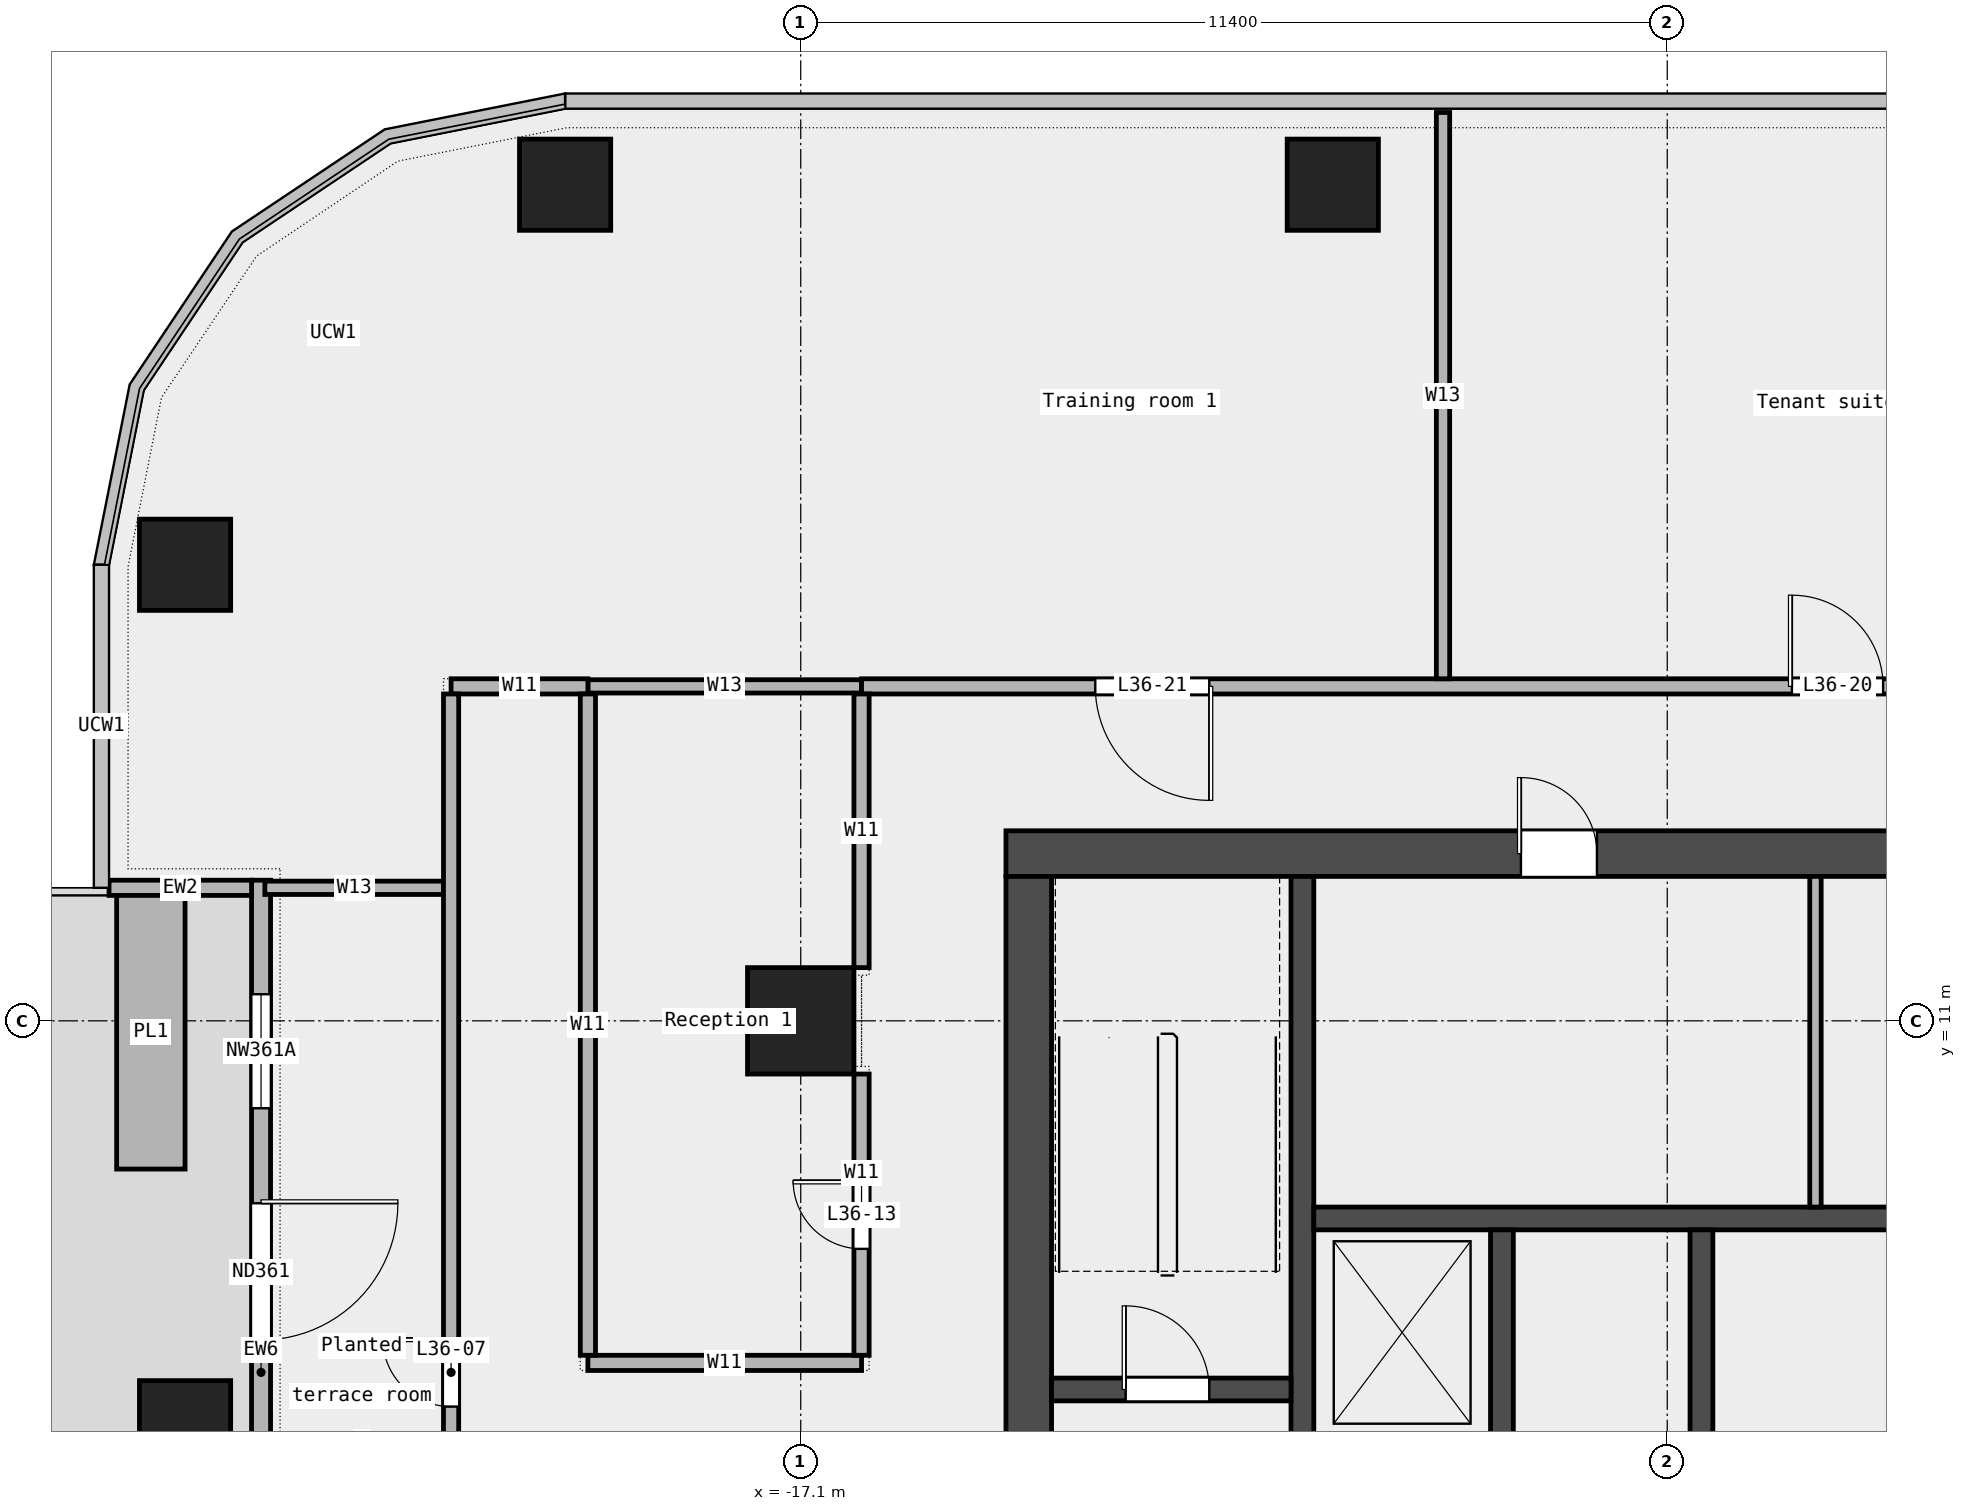
"""IFC4 building model, lengths in metres.
Left out: names, types, materials, properties, quantities, classifications, styles, units other than length and angle.
Written with IfcOpenShell. Run it as: python <this file> out.ifc"""

import sys

from ifc_helpers import new_model, si_unit, direction, frame, frame_2d, origin, origin_2d, place, context, subcontext, project, spatial, rectangle, extrude, element, fill, save


model = new_model("IFC4")
c1 = context("Model", 3, precision=1e-05, world=origin(), true_north=direction((0.0, 1.0)))
c2 = subcontext(c1, "Body", "Model", "MODEL_VIEW")
j1 = project(units=[si_unit("LENGTHUNIT", "METRE"), si_unit("PLANEANGLEUNIT", "RADIAN")], contexts=[c1])
p1 = place(None, origin())
s1 = spatial("IfcSite", under=j1, at=p1, CompositionType="ELEMENT")
p2 = place(p1, origin())
s2 = spatial("IfcBuilding", under=s1, at=p2, CompositionType="ELEMENT")
p3 = place(p2, frame((0.0, 0.0, 177.0)))
s3 = spatial("IfcBuildingStorey", under=s2, at=p3, CompositionType="ELEMENT", Elevation=177.0)
for number, where, z_axis, x_axis in (
    (1, (-10.1, 22.0, 0.0), (0.0, 0.0, 1.0), (1.0, 0.0, 0.0)),
    (2, (-20.2, 22.0, 0.0), (0.0, 0.0, 1.0), (1.0, 0.0, 0.0)),
    (3, (-25.2, 17.0, 0.0), (0.0, 0.0, 1.0), (1.0, 0.0, 0.0)),
    (4, (-25.2, 5.667, 0.0), (0.0, 0.0, 1.0), (1.0, 0.0, 0.0)),
):
    element("IfcColumn", number, at=place(p3, frame(where, z_axis=z_axis, x_axis=x_axis)), inside=s3, PredefinedType="COLUMN", context=c2, shape_type="SweptSolid", body=[
        extrude(rectangle(XDim=1.2, YDim=1.2, at=origin_2d()), origin(), (0.0, 0.0, 1.0), 3.6),
    ])
p4 = place(p3, frame((-17.1, 11.0, 0.0), z_axis=(0.0, 0.0, 1.0), x_axis=(1.0, 0.0, 0.0)))
e5 = element("IfcColumn", 5, at=p4, inside=s3, PredefinedType="COLUMN", context=c2, shape_type="SweptSolid", body=[
    extrude(rectangle(XDim=1.4, YDim=1.4, at=origin_2d()), origin(), (0.0, 0.0, 1.0), 3.6),
])
p5 = place(p3, frame((-24.2, 12.85, 0.0), z_axis=(0.0, 0.0, 1.0), x_axis=(0.0, -1.0, 0.0)))
e6 = element("IfcWall", 6, at=p5, inside=s3, PredefinedType="STANDARD", context=c2, shape_type="SweptSolid", body=[
    extrude(rectangle(XDim=12.95, YDim=0.25, at=frame_2d((6.475, 0.0))), origin(), (0.0, 0.0, 1.0), 3.6),
])
p6 = place(p5, frame((1.5, 0.0, 0.45)))
e7 = element("IfcOpeningElement", 7, at=p6, cuts=e6, PredefinedType="OPENING", context=c2, shape_type="SweptSolid", body=[
    extrude(rectangle(XDim=1.5, YDim=2.4, at=frame_2d((0.75, 1.2))), frame((0.0, 0.137, 0.0), z_axis=(0.0, -1.0, 0.0), x_axis=(1.0, 0.0, 0.0)), (0.0, 0.0, 1.0), 0.274),
])
p7 = place(p5, frame((4.25, 0.0, 0.0)))
e8 = element("IfcOpeningElement", 8, at=p7, cuts=e6, PredefinedType="OPENING", context=c2, shape_type="SweptSolid", body=[
    extrude(rectangle(XDim=1.8, YDim=2.4, at=frame_2d((0.9, 1.2))), frame((0.0, 0.137, 0.0), z_axis=(0.0, -1.0, 0.0), x_axis=(1.0, 0.0, 0.0)), (0.0, 0.0, 1.0), 0.274),
])
p8 = place(p5, frame((10.0, 0.0, 0.45)))
e9 = element("IfcOpeningElement", 9, at=p8, cuts=e6, PredefinedType="OPENING", context=c2, shape_type="SweptSolid", body=[
    extrude(rectangle(XDim=1.5, YDim=2.4, at=frame_2d((0.75, 1.2))), frame((0.0, 0.137, 0.0), z_axis=(0.0, -1.0, 0.0), x_axis=(1.0, 0.0, 0.0)), (0.0, 0.0, 1.0), 0.274),
])
p9 = place(p3, frame((-26.2, 12.75, 0.0), z_axis=(0.0, 0.0, 1.0), x_axis=(1.0, 0.0, 0.0)))
e10 = element("IfcWall", 10, at=p9, inside=s3, PredefinedType="STANDARD", context=c2, shape_type="SweptSolid", body=[
    extrude(rectangle(XDim=1.875, YDim=0.2, at=frame_2d((0.938, 0.0))), origin(), (0.0, 0.0, 1.0), 3.6),
])
p10 = place(p3, frame((-25.65, 12.65, 0.0), z_axis=(0.0, 0.0, 1.0), x_axis=(0.0, -1.0, 0.0)))
e11 = element("IfcWall", 11, at=p10, inside=s3, PredefinedType="STANDARD", context=c2, shape_type="SweptSolid", body=[
    extrude(rectangle(XDim=3.6, YDim=0.9, at=frame_2d((1.8, 0.0))), origin(), (0.0, 0.0, 1.0), 0.7),
])
p11 = place(p3, frame((-19.9, 6.5, 0.0), z_axis=(0.0, 0.0, 1.0), x_axis=(1.0, 0.0, 0.0)))
e12 = element("IfcWall", 12, at=p11, inside=s3, PredefinedType="PARTITIONING", context=c2, shape_type="SweptSolid", body=[
    extrude(rectangle(XDim=3.6, YDim=0.2, at=frame_2d((1.8, 0.0))), origin(), (0.0, 0.0, 1.0), 3.6),
])
p12 = place(p3, frame((-24.15, 12.75, 0.0), z_axis=(0.0, 0.0, 1.0), x_axis=(1.0, 0.0, 0.0)))
e13 = element("IfcWall", 13, at=p12, inside=s3, PredefinedType="PARTITIONING", context=c2, shape_type="SweptSolid", body=[
    extrude(rectangle(XDim=2.35, YDim=0.175, at=frame_2d((1.175, 0.0))), origin(), (0.0, 0.0, 1.0), 3.6),
])
p13 = place(p3, frame((-19.9, 15.4, 0.0), z_axis=(0.0, 0.0, 1.0), x_axis=(1.0, 0.0, 0.0)))
e14 = element("IfcWall", 14, at=p13, inside=s3, PredefinedType="PARTITIONING", context=c2, shape_type="SweptSolid", body=[
    extrude(rectangle(XDim=3.6, YDim=0.175, at=frame_2d((1.8, 0.0))), origin(), (0.0, 0.0, 1.0), 3.6),
])
p14 = place(p3, frame((-21.7, 15.4, 0.0), z_axis=(0.0, 0.0, 1.0), x_axis=(1.0, 0.0, 0.0)))
e15 = element("IfcWall", 15, at=p14, inside=s3, PredefinedType="PARTITIONING", context=c2, shape_type="SweptSolid", body=[
    extrude(rectangle(XDim=1.8, YDim=0.2, at=frame_2d((0.9, 0.0))), origin(), (0.0, 0.0, 1.0), 3.6),
])
p15 = place(p3, frame((-16.3, 15.4, 0.0), z_axis=(0.0, 0.0, 1.0), x_axis=(1.0, 0.0, 0.0)))
e16 = element("IfcWall", 16, at=p15, inside=s3, PredefinedType="PARTITIONING", context=c2, shape_type="SweptSolid", body=[
    extrude(rectangle(XDim=32.6, YDim=0.2, at=frame_2d((16.3, 0.0))), origin(), (0.0, 0.0, 1.0), 3.6),
])
p16 = place(p15, frame((24.415, 0.0, 0.0)))
e17 = element("IfcOpeningElement", 17, at=p16, cuts=e16, PredefinedType="OPENING", context=c2, shape_type="SweptSolid", body=[
    extrude(rectangle(XDim=1.8, YDim=2.1, at=frame_2d((0.9, 1.05))), frame((0.0, 0.112, 0.0), z_axis=(0.0, -1.0, 0.0), x_axis=(1.0, 0.0, 0.0)), (0.0, 0.0, 1.0), 0.224),
])
p17 = place(p15, frame((12.24, 0.0, 0.0)))
e18 = element("IfcOpeningElement", 18, at=p17, cuts=e16, PredefinedType="OPENING", context=c2, shape_type="SweptSolid", body=[
    extrude(rectangle(XDim=1.2, YDim=2.1, at=frame_2d((0.6, 1.05))), frame((0.0, 0.112, 0.0), z_axis=(0.0, -1.0, 0.0), x_axis=(1.0, 0.0, 0.0)), (0.0, 0.0, 1.0), 0.224),
])
p18 = place(p15, frame((3.075, 0.0, 0.0)))
e19 = element("IfcOpeningElement", 19, at=p18, cuts=e16, PredefinedType="OPENING", context=c2, shape_type="SweptSolid", body=[
    extrude(rectangle(XDim=1.5, YDim=2.1, at=frame_2d((0.75, 1.05))), frame((0.0, 0.112, 0.0), z_axis=(0.0, -1.0, 0.0), x_axis=(1.0, 0.0, 0.0)), (0.0, 0.0, 1.0), 0.224),
])
p19 = place(p3, frame((-21.7, -9.0, 0.0), z_axis=(0.0, 0.0, 1.0), x_axis=(0.0, 1.0, 0.0)))
e20 = element("IfcWall", 20, at=p19, inside=s3, PredefinedType="PARTITIONING", context=c2, shape_type="SweptSolid", body=[
    extrude(rectangle(XDim=24.3, YDim=0.2, at=frame_2d((12.15, 0.0))), origin(), (0.0, 0.0, 1.0), 3.6),
])
p20 = place(p19, frame((14.925, 0.0, 0.0)))
e21 = element("IfcOpeningElement", 21, at=p20, cuts=e20, PredefinedType="OPENING", context=c2, shape_type="SweptSolid", body=[
    extrude(rectangle(XDim=0.9, YDim=2.1, at=frame_2d((0.45, 1.05))), frame((0.0, 0.112, 0.0), z_axis=(0.0, -1.0, 0.0), x_axis=(1.0, 0.0, 0.0)), (0.0, 0.0, 1.0), 0.224),
])
p21 = place(p19, frame((2.562, 0.0, 0.0)))
e22 = element("IfcOpeningElement", 22, at=p21, cuts=e20, PredefinedType="OPENING", context=c2, shape_type="SweptSolid", body=[
    extrude(rectangle(XDim=0.9, YDim=2.1, at=frame_2d((0.45, 1.05))), frame((0.0, 0.112, 0.0), z_axis=(0.0, -1.0, 0.0), x_axis=(1.0, 0.0, 0.0)), (0.0, 0.0, 1.0), 0.224),
])
p22 = place(p3, frame((-19.9, 6.6, 0.0), z_axis=(0.0, 0.0, 1.0), x_axis=(0.0, 1.0, 0.0)))
e23 = element("IfcWall", 23, at=p22, inside=s3, PredefinedType="PARTITIONING", context=c2, shape_type="SweptSolid", body=[
    extrude(rectangle(XDim=8.7, YDim=0.2, at=frame_2d((4.35, 0.0))), origin(), (0.0, 0.0, 1.0), 3.6),
])
p23 = place(p3, frame((-16.3, 6.6, 0.0), z_axis=(0.0, 0.0, 1.0), x_axis=(0.0, 1.0, 0.0)))
e24 = element("IfcWall", 24, at=p23, inside=s3, PredefinedType="PARTITIONING", context=c2, shape_type="SweptSolid", body=[
    extrude(rectangle(XDim=3.7, YDim=0.2, at=frame_2d((1.85, 0.0))), origin(), (0.0, 0.0, 1.0), 3.6),
])
p24 = place(p23, frame((1.4, 0.0, 0.0)))
e25 = element("IfcOpeningElement", 25, at=p24, cuts=e24, PredefinedType="OPENING", context=c2, shape_type="SweptSolid", body=[
    extrude(rectangle(XDim=0.9, YDim=2.1, at=frame_2d((0.45, 1.05))), frame((0.0, 0.112, 0.0), z_axis=(0.0, -1.0, 0.0), x_axis=(1.0, 0.0, 0.0)), (0.0, 0.0, 1.0), 0.224),
])
p25 = place(p3, frame((-16.3, 11.7, 0.0), z_axis=(0.0, 0.0, 1.0), x_axis=(0.0, 1.0, 0.0)))
e26 = element("IfcWall", 26, at=p25, inside=s3, PredefinedType="PARTITIONING", context=c2, shape_type="SweptSolid", body=[
    extrude(rectangle(XDim=3.6, YDim=0.2, at=frame_2d((1.8, 0.0))), origin(), (0.0, 0.0, 1.0), 3.6),
])
p26 = place(p3, frame((-8.65, 15.5, 0.0), z_axis=(0.0, 0.0, 1.0), x_axis=(0.0, 1.0, 0.0)))
e27 = element("IfcWall", 27, at=p26, inside=s3, PredefinedType="PARTITIONING", context=c2, shape_type="SweptSolid", body=[
    extrude(rectangle(XDim=7.45, YDim=0.175, at=frame_2d((3.725, 0.0))), origin(), (0.0, 0.0, 1.0), 3.6),
])
p27 = place(p3, frame((-14.4, 13.2, 0.0), z_axis=(0.0, 0.0, 1.0), x_axis=(1.0, 0.0, 0.0)))
e28 = element("IfcWall", 28, at=p27, inside=s3, PredefinedType="SHEAR", context=c2, shape_type="SweptSolid", body=[
    extrude(rectangle(XDim=28.8, YDim=0.6, at=frame_2d((14.4, 0.0))), origin(), (0.0, 0.0, 1.0), 3.7),
])
p28 = place(p27, frame((6.775, 0.0, 0.0)))
e29 = element("IfcOpeningElement", 29, at=p28, cuts=e28, PredefinedType="OPENING", context=c2, shape_type="SweptSolid", body=[
    extrude(rectangle(XDim=1.0, YDim=2.1, at=frame_2d((0.5, 1.05))), frame((0.0, 0.312, 0.0), z_axis=(0.0, -1.0, 0.0), x_axis=(1.0, 0.0, 0.0)), (0.0, 0.0, 1.0), 0.624),
])
p29 = place(p27, frame((13.337, 0.0, 0.0)))
e30 = element("IfcOpeningElement", 30, at=p29, cuts=e28, PredefinedType="OPENING", context=c2, shape_type="SweptSolid", body=[
    extrude(rectangle(XDim=1.0, YDim=2.1, at=frame_2d((0.5, 1.05))), frame((0.0, 0.312, 0.0), z_axis=(0.0, -1.0, 0.0), x_axis=(1.0, 0.0, 0.0)), (0.0, 0.0, 1.0), 0.624),
])
p30 = place(p27, frame((18.4, 0.0, 0.0)))
e31 = element("IfcOpeningElement", 31, at=p30, cuts=e28, PredefinedType="OPENING", context=c2, shape_type="SweptSolid", body=[
    extrude(rectangle(XDim=1.0, YDim=2.1, at=frame_2d((0.5, 1.05))), frame((0.0, 0.312, 0.0), z_axis=(0.0, -1.0, 0.0), x_axis=(1.0, 0.0, 0.0)), (0.0, 0.0, 1.0), 0.624),
])
p31 = place(p27, frame((22.337, 0.0, 0.0)))
e32 = element("IfcOpeningElement", 32, at=p31, cuts=e28, PredefinedType="OPENING", context=c2, shape_type="SweptSolid", body=[
    extrude(rectangle(XDim=1.0, YDim=2.1, at=frame_2d((0.5, 1.05))), frame((0.0, 0.312, 0.0), z_axis=(0.0, -1.0, 0.0), x_axis=(1.0, 0.0, 0.0)), (0.0, 0.0, 1.0), 0.624),
])
p32 = place(p3, frame((-14.1, -6.6, 0.0), z_axis=(0.0, 0.0, 1.0), x_axis=(0.0, 1.0, 0.0)))
e33 = element("IfcWall", 33, at=p32, inside=s3, PredefinedType="SHEAR", context=c2, shape_type="SweptSolid", body=[
    extrude(rectangle(XDim=19.5, YDim=0.6, at=frame_2d((9.75, 0.0))), origin(), (0.0, 0.0, 1.0), 3.7),
])
p33 = place(p32, frame((9.3, 0.0, 0.0)))
e34 = element("IfcOpeningElement", 34, at=p33, cuts=e33, PredefinedType="OPENING", context=c2, shape_type="SweptSolid", body=[
    extrude(rectangle(XDim=1.8, YDim=2.1, at=frame_2d((0.9, 1.05))), frame((0.0, 0.312, 0.0), z_axis=(0.0, -1.0, 0.0), x_axis=(1.0, 0.0, 0.0)), (0.0, 0.0, 1.0), 0.624),
])
p34 = place(p3, frame((-10.5, 5.25, 0.0), z_axis=(0.0, 0.0, 1.0), x_axis=(0.0, 1.0, 0.0)))
e35 = element("IfcWall", 35, at=p34, inside=s3, PredefinedType="SHEAR", context=c2, shape_type="SweptSolid", body=[
    extrude(rectangle(XDim=7.65, YDim=0.3, at=frame_2d((3.825, 0.0))), origin(), (0.0, 0.0, 1.0), 3.7),
])
p35 = place(p3, frame((-13.8, 6.15, 0.0), z_axis=(0.0, 0.0, 1.0), x_axis=(1.0, 0.0, 0.0)))
e36 = element("IfcWall", 36, at=p35, inside=s3, PredefinedType="SOLIDWALL", context=c2, shape_type="SweptSolid", body=[
    extrude(rectangle(XDim=3.15, YDim=0.3, at=frame_2d((1.575, 0.0))), origin(), (0.0, 0.0, 1.0), 3.7),
])
p36 = place(p35, frame((0.975, 0.0, 0.0)))
e37 = element("IfcOpeningElement", 37, at=p36, cuts=e36, PredefinedType="OPENING", context=c2, shape_type="SweptSolid", body=[
    extrude(rectangle(XDim=1.1, YDim=2.1, at=frame_2d((0.55, 1.05))), frame((0.0, 0.162, 0.0), z_axis=(0.0, -1.0, 0.0), x_axis=(1.0, 0.0, 0.0)), (0.0, 0.0, 1.0), 0.324),
])
p37 = place(p3, frame((-10.35, 8.4, 0.0), z_axis=(0.0, 0.0, 1.0), x_axis=(1.0, 0.0, 0.0)))
e38 = element("IfcWall", 38, at=p37, inside=s3, PredefinedType="SOLIDWALL", context=c2, shape_type="SweptSolid", body=[
    extrude(rectangle(XDim=20.7, YDim=0.3, at=frame_2d((10.35, 0.0))), origin(), (0.0, 0.0, 1.0), 3.7),
])
for number, where, z_axis, x_axis in (
    (39, (-7.875, 5.55, 0.0), (0.0, 0.0, 1.0), (0.0, 1.0, 0.0)),
    (40, (-5.25, 5.55, 0.0), (0.0, 0.0, 1.0), (0.0, 1.0, 0.0)),
):
    element("IfcWall", number, at=place(p3, frame(where, z_axis=z_axis, x_axis=x_axis)), inside=s3, PredefinedType="SOLIDWALL", context=c2, shape_type="SweptSolid", body=[
        extrude(rectangle(XDim=2.7, YDim=0.3, at=frame_2d((1.35, 0.0))), origin(), (0.0, 0.0, 1.0), 3.7),
    ])
p38 = place(p3, frame((-3.75, 8.55, 0.0), z_axis=(0.0, 0.0, 1.0), x_axis=(0.0, 1.0, 0.0)))
e41 = element("IfcWall", 41, at=p38, inside=s3, PredefinedType="PARTITIONING", context=c2, shape_type="SweptSolid", body=[
    extrude(rectangle(XDim=4.35, YDim=0.15, at=frame_2d((2.175, 0.0))), origin(), (0.0, 0.0, 1.0), 3.7),
])
p39 = place(p6, origin())
e42 = element("IfcWindow", 42, at=p39, inside=s3, PartitioningType="SINGLE_PANEL", PredefinedType="WINDOW", context=c2, shape_type="SweptSolid", body=[
    extrude(rectangle(XDim=1.5, YDim=2.4, at=frame_2d((0.75, 1.2))), frame((0.0, 0.03, 0.0), z_axis=(0.0, -1.0, 0.0), x_axis=(1.0, 0.0, 0.0)), (0.0, 0.0, 1.0), 0.06),
])
fill(e7, e42)
p40 = place(p7, origin())
e43 = element("IfcDoor", 43, at=p40, inside=s3, OperationType="DOUBLE_DOOR_SINGLE_SWING", PredefinedType="DOOR", context=c2, shape_type="SweptSolid", body=[
    extrude(rectangle(XDim=1.8, YDim=2.4, at=frame_2d((0.9, 1.2))), frame((0.0, 0.025, 0.0), z_axis=(0.0, -1.0, 0.0), x_axis=(1.0, 0.0, 0.0)), (0.0, 0.0, 1.0), 0.05),
])
fill(e8, e43)
p41 = place(p20, origin())
e44 = element("IfcDoor", 44, at=p41, inside=s3, OperationType="SINGLE_SWING_RIGHT", PredefinedType="DOOR", context=c2, shape_type="SweptSolid", body=[
    extrude(rectangle(XDim=0.9, YDim=2.1, at=frame_2d((0.45, 1.05))), frame((0.0, 0.025, 0.0), z_axis=(0.0, -1.0, 0.0), x_axis=(1.0, 0.0, 0.0)), (0.0, 0.0, 1.0), 0.05),
])
fill(e21, e44)
p42 = place(p24, origin())
e45 = element("IfcDoor", 45, at=p42, inside=s3, OperationType="SINGLE_SWING_RIGHT", PredefinedType="DOOR", context=c2, shape_type="SweptSolid", body=[
    extrude(rectangle(XDim=0.9, YDim=2.1, at=frame_2d((0.45, 1.05))), frame((0.0, 0.025, 0.0), z_axis=(0.0, -1.0, 0.0), x_axis=(1.0, 0.0, 0.0)), (0.0, 0.0, 1.0), 0.05),
])
fill(e25, e45)
p43 = place(p17, origin())
e46 = element("IfcDoor", 46, at=p43, inside=s3, OperationType="SINGLE_SWING_LEFT", PredefinedType="DOOR", context=c2, shape_type="SweptSolid", body=[
    extrude(rectangle(XDim=1.2, YDim=2.1, at=frame_2d((0.6, 1.05))), frame((0.0, 0.025, 0.0), z_axis=(0.0, -1.0, 0.0), x_axis=(1.0, 0.0, 0.0)), (0.0, 0.0, 1.0), 0.05),
])
fill(e18, e46)
p44 = place(p18, origin())
e47 = element("IfcDoor", 47, at=p44, inside=s3, OperationType="DOUBLE_DOOR_SINGLE_SWING", PredefinedType="DOOR", context=c2, shape_type="SweptSolid", body=[
    extrude(rectangle(XDim=1.5, YDim=2.1, at=frame_2d((0.75, 1.05))), frame((0.0, 0.025, 0.0), z_axis=(0.0, -1.0, 0.0), x_axis=(1.0, 0.0, 0.0)), (0.0, 0.0, 1.0), 0.05),
])
fill(e19, e47)
p45 = place(p36, origin())
e48 = element("IfcDoor", 48, at=p45, inside=s3, OperationType="SINGLE_SWING_LEFT", PredefinedType="DOOR", context=c2, shape_type="SweptSolid", body=[
    extrude(rectangle(XDim=1.1, YDim=2.1, at=frame_2d((0.55, 1.05))), frame((0.0, 0.025, 0.0), z_axis=(0.0, -1.0, 0.0), x_axis=(1.0, 0.0, 0.0)), (0.0, 0.0, 1.0), 0.05),
])
fill(e37, e48)
p46 = place(p28, origin())
e49 = element("IfcDoor", 49, at=p46, inside=s3, OperationType="SINGLE_SWING_LEFT", PredefinedType="DOOR", context=c2, shape_type="SweptSolid", body=[
    extrude(rectangle(XDim=1.0, YDim=2.1, at=frame_2d((0.5, 1.05))), frame((0.0, 0.025, 0.0), z_axis=(0.0, -1.0, 0.0), x_axis=(1.0, 0.0, 0.0)), (0.0, 0.0, 1.0), 0.05),
])
fill(e29, e49)
save(model, sys.argv[1])
